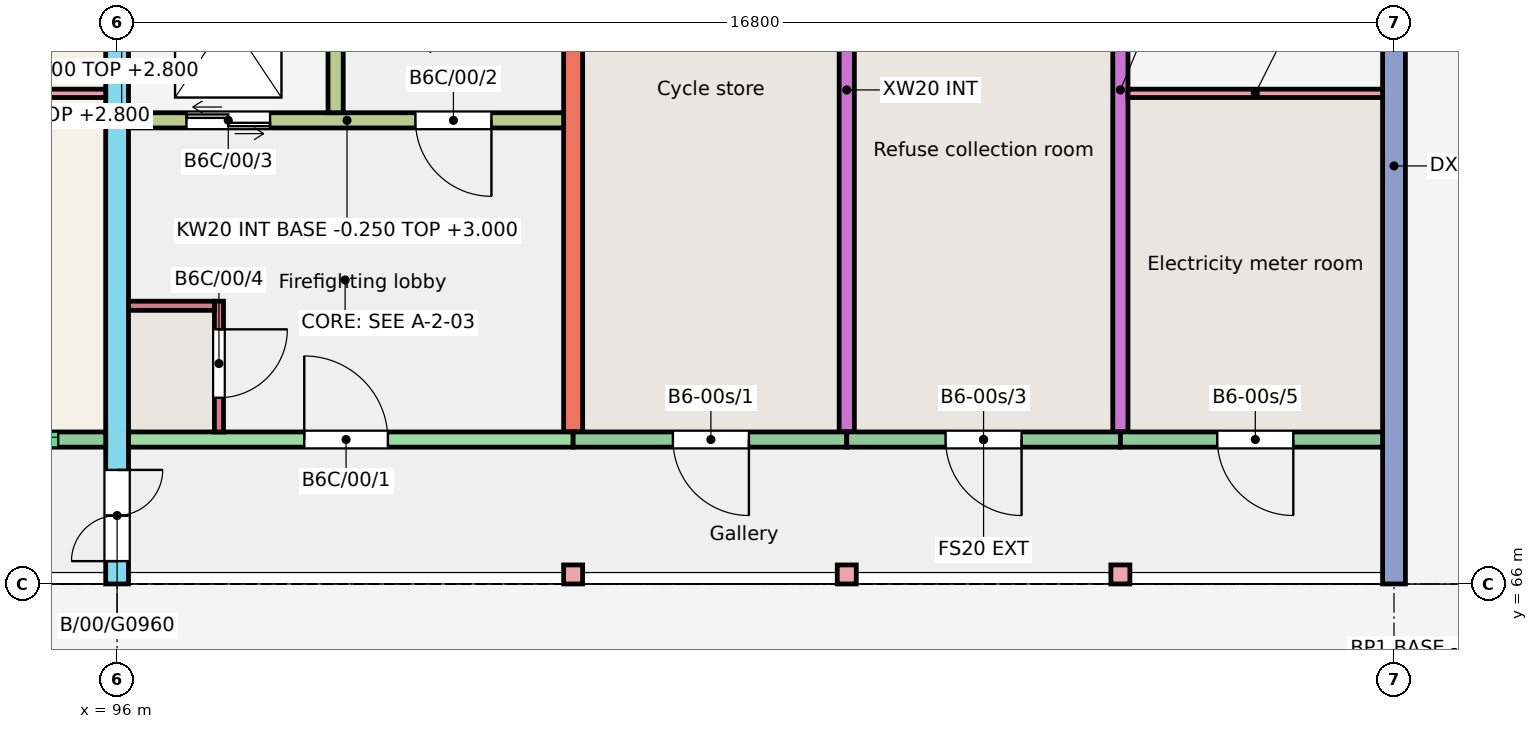
"""IFC4 building model, lengths in metres.
Left out: names, types, materials, properties, quantities, classifications, styles, units other than length and angle.
Written with IfcOpenShell. Run it as: python <this file> out.ifc"""

import sys

from ifc_helpers import new_model, si_unit, direction, frame, frame_2d, origin, origin_2d, place, context, subcontext, project, spatial, rectangle, extrude, element, fill, save


model = new_model("IFC4")
c1 = context("Model", 3, precision=1e-05, world=origin(), true_north=direction((0.0, 1.0)))
c2 = subcontext(c1, "Body", "Model", "MODEL_VIEW")
j1 = project(units=[si_unit("LENGTHUNIT", "METRE"), si_unit("PLANEANGLEUNIT", "RADIAN")], contexts=[c1])
p1 = place(None, origin())
s1 = spatial("IfcSite", under=j1, at=p1, CompositionType="ELEMENT")
p2 = place(p1, origin())
s2 = spatial("IfcBuilding", under=s1, at=p2, CompositionType="ELEMENT")
p3 = place(p2, origin())
s3 = spatial("IfcBuildingStorey", under=s2, at=p3, CompositionType="ELEMENT", Elevation=0.0)
p4 = place(p3, frame((96.0, 66.0, -0.25), z_axis=(0.0, 0.0, 1.0), x_axis=(0.0, 1.0, 0.0)))
e1 = element("IfcWall", 1, at=p4, inside=s3, PredefinedType="SHEAR", context=c2, shape_type="SweptSolid", body=[
    extrude(rectangle(XDim=11.0, YDim=0.3, at=frame_2d((5.5, 0.0))), origin(), (0.0, 0.0, 1.0), 3.25),
])
p5 = place(p4, frame((0.3, 0.0, 0.25)))
e2 = element("IfcOpeningElement", 2, at=p5, cuts=e1, PredefinedType="OPENING", context=c2, shape_type="SweptSolid", body=[
    extrude(rectangle(XDim=1.2, YDim=2.1, at=frame_2d((0.6, 1.05))), frame((0.0, 0.16, 0.0), z_axis=(0.0, -1.0, 0.0), x_axis=(1.0, 0.0, 0.0)), (0.0, 0.0, 1.0), 0.32),
])
p6 = place(p3, frame((102.0, 68.0, -0.25), z_axis=(0.0, 0.0, 1.0), x_axis=(0.0, 1.0, 0.0)))
e3 = element("IfcWall", 3, at=p6, inside=s3, PredefinedType="SHEAR", context=c2, shape_type="SweptSolid", body=[
    extrude(rectangle(XDim=9.0, YDim=0.25, at=frame_2d((4.5, 0.0))), origin(), (0.0, 0.0, 1.0), 3.25),
])
for number, where, z_axis, x_axis in (
    (4, (105.6, 68.0, -0.25), (0.0, 0.0, 1.0), (0.0, 1.0, 0.0)),
    (5, (109.2, 68.0, -0.25), (0.0, 0.0, 1.0), (0.0, 1.0, 0.0)),
):
    element("IfcWall", number, at=place(p3, frame(where, z_axis=z_axis, x_axis=x_axis)), inside=s3, PredefinedType="SHEAR", context=c2, shape_type="SweptSolid", body=[
        extrude(rectangle(XDim=9.0, YDim=0.2, at=frame_2d((4.5, 0.0))), origin(), (0.0, 0.0, 1.0), 3.25),
    ])
p7 = place(p3, frame((112.8, 66.0, -0.25), z_axis=(0.0, 0.0, 1.0), x_axis=(0.0, 1.0, 0.0)))
e6 = element("IfcWall", 6, at=p7, inside=s3, PredefinedType="SHEAR", context=c2, shape_type="SweptSolid", body=[
    extrude(rectangle(XDim=11.0, YDim=0.3, at=frame_2d((5.5, 0.0))), origin(), (0.0, 0.0, 1.0), 3.25),
])
p8 = place(p3, frame((92.4, 67.9, -0.25), z_axis=(0.0, 0.0, 1.0), x_axis=(1.0, 0.0, 0.0)))
e7 = element("IfcWall", 7, at=p8, inside=s3, PredefinedType="SOLIDWALL", context=c2, shape_type="SweptSolid", body=[
    extrude(rectangle(XDim=3.45, YDim=0.2, at=frame_2d((1.725, 0.0))), origin(), (0.0, 0.0, 1.0), 3.25),
])
p9 = place(p8, frame((0.725, 0.0, 1.45)))
e8 = element("IfcOpeningElement", 8, at=p9, cuts=e7, PredefinedType="OPENING", context=c2, shape_type="SweptSolid", body=[
    extrude(rectangle(XDim=2.1, YDim=1.2, at=frame_2d((1.05, 0.6))), frame((0.0, 0.11, 0.0), z_axis=(0.0, -1.0, 0.0), x_axis=(1.0, 0.0, 0.0)), (0.0, 0.0, 1.0), 0.22),
])
p10 = place(p3, frame((96.15, 67.9, -0.25), z_axis=(0.0, 0.0, 1.0), x_axis=(1.0, 0.0, 0.0)))
e9 = element("IfcWall", 9, at=p10, inside=s3, PredefinedType="SHEAR", context=c2, shape_type="SweptSolid", body=[
    extrude(rectangle(XDim=5.85, YDim=0.2, at=frame_2d((2.925, 0.0))), origin(), (0.0, 0.0, 1.0), 3.25),
])
p11 = place(p10, frame((2.312, 0.0, 0.25)))
e10 = element("IfcOpeningElement", 10, at=p11, cuts=e9, PredefinedType="OPENING", context=c2, shape_type="SweptSolid", body=[
    extrude(rectangle(XDim=1.1, YDim=2.1, at=frame_2d((0.55, 1.05))), frame((0.0, 0.11, 0.0), z_axis=(0.0, -1.0, 0.0), x_axis=(1.0, 0.0, 0.0)), (0.0, 0.0, 1.0), 0.22),
])
p12 = place(p3, frame((96.15, 72.1, -0.25), z_axis=(0.0, 0.0, 1.0), x_axis=(1.0, 0.0, 0.0)))
e11 = element("IfcWall", 11, at=p12, inside=s3, PredefinedType="SHEAR", context=c2, shape_type="SweptSolid", body=[
    extrude(rectangle(XDim=5.725, YDim=0.2, at=frame_2d((2.863, 0.0))), origin(), (0.0, 0.0, 1.0), 3.25),
])
p13 = place(p12, frame((3.775, 0.0, 0.25)))
e12 = element("IfcOpeningElement", 12, at=p13, cuts=e11, PredefinedType="OPENING", context=c2, shape_type="SweptSolid", body=[
    extrude(rectangle(XDim=1.0, YDim=2.1, at=frame_2d((0.5, 1.05))), frame((0.0, 0.11, 0.0), z_axis=(0.0, -1.0, 0.0), x_axis=(1.0, 0.0, 0.0)), (0.0, 0.0, 1.0), 0.22),
])
p14 = place(p12, frame((0.762, 0.0, 0.25)))
e13 = element("IfcOpeningElement", 13, at=p14, cuts=e11, PredefinedType="OPENING", context=c2, shape_type="SweptSolid", body=[
    extrude(rectangle(XDim=1.1, YDim=2.1, at=frame_2d((0.55, 1.05))), frame((0.0, 0.11, 0.0), z_axis=(0.0, -1.0, 0.0), x_axis=(1.0, 0.0, 0.0)), (0.0, 0.0, 1.0), 0.22),
])
p15 = place(p3, frame((98.875, 72.2, -0.25), z_axis=(0.0, 0.0, 1.0), x_axis=(0.0, 1.0, 0.0)))
e14 = element("IfcWall", 14, at=p15, inside=s3, PredefinedType="SHEAR", context=c2, shape_type="SweptSolid", body=[
    extrude(rectangle(XDim=4.8, YDim=0.2, at=frame_2d((2.4, 0.0))), origin(), (0.0, 0.0, 1.0), 3.25),
])
p16 = place(p3, frame((97.34, 68.0, -0.25), z_axis=(0.0, 0.0, 1.0), x_axis=(0.0, 1.0, 0.0)))
e15 = element("IfcWall", 15, at=p16, inside=s3, PredefinedType="SHEAR", context=c2, shape_type="SweptSolid", body=[
    extrude(rectangle(XDim=1.72, YDim=0.12, at=frame_2d((0.86, 0.0))), origin(), (0.0, 0.0, 1.0), 3.25),
])
p17 = place(p16, frame((0.45, 0.0, 0.25)))
e16 = element("IfcOpeningElement", 16, at=p17, cuts=e15, PredefinedType="OPENING", context=c2, shape_type="SweptSolid", body=[
    extrude(rectangle(XDim=0.9, YDim=2.1, at=frame_2d((0.45, 1.05))), frame((0.0, 0.07, 0.0), z_axis=(0.0, -1.0, 0.0), x_axis=(1.0, 0.0, 0.0)), (0.0, 0.0, 1.0), 0.14),
])
p18 = place(p3, frame((96.15, 69.66, -0.25), z_axis=(0.0, 0.0, 1.0), x_axis=(1.0, 0.0, 0.0)))
e17 = element("IfcWall", 17, at=p18, inside=s3, PredefinedType="SHEAR", context=c2, shape_type="SweptSolid", body=[
    extrude(rectangle(XDim=1.13, YDim=0.12, at=frame_2d((0.565, 0.0))), origin(), (0.0, 0.0, 1.0), 3.25),
])
p19 = place(p3, frame((102.0, 67.9, -0.25), z_axis=(0.0, 0.0, 1.0), x_axis=(1.0, 0.0, 0.0)))
e18 = element("IfcWall", 18, at=p19, inside=s3, PredefinedType="SOLIDWALL", context=c2, shape_type="SweptSolid", body=[
    extrude(rectangle(XDim=3.6, YDim=0.2, at=frame_2d((1.8, 0.0))), origin(), (0.0, 0.0, 1.0), 3.25),
])
p20 = place(p19, frame((1.312, 0.0, 0.25)))
e19 = element("IfcOpeningElement", 19, at=p20, cuts=e18, PredefinedType="OPENING", context=c2, shape_type="SweptSolid", body=[
    extrude(rectangle(XDim=1.0, YDim=2.1, at=frame_2d((0.5, 1.05))), frame((0.0, 0.11, 0.0), z_axis=(0.0, -1.0, 0.0), x_axis=(1.0, 0.0, 0.0)), (0.0, 0.0, 1.0), 0.22),
])
p21 = place(p3, frame((105.6, 67.9, -0.25), z_axis=(0.0, 0.0, 1.0), x_axis=(1.0, 0.0, 0.0)))
e20 = element("IfcWall", 20, at=p21, inside=s3, PredefinedType="SOLIDWALL", context=c2, shape_type="SweptSolid", body=[
    extrude(rectangle(XDim=3.6, YDim=0.2, at=frame_2d((1.8, 0.0))), origin(), (0.0, 0.0, 1.0), 3.25),
])
p22 = place(p21, frame((1.3, 0.0, 0.25)))
e21 = element("IfcOpeningElement", 21, at=p22, cuts=e20, PredefinedType="OPENING", context=c2, shape_type="SweptSolid", body=[
    extrude(rectangle(XDim=1.0, YDim=2.1, at=frame_2d((0.5, 1.05))), frame((0.0, 0.11, 0.0), z_axis=(0.0, -1.0, 0.0), x_axis=(1.0, 0.0, 0.0)), (0.0, 0.0, 1.0), 0.22),
])
p23 = place(p3, frame((109.2, 67.9, -0.25), z_axis=(0.0, 0.0, 1.0), x_axis=(1.0, 0.0, 0.0)))
e22 = element("IfcWall", 22, at=p23, inside=s3, PredefinedType="SOLIDWALL", context=c2, shape_type="SweptSolid", body=[
    extrude(rectangle(XDim=3.45, YDim=0.2, at=frame_2d((1.725, 0.0))), origin(), (0.0, 0.0, 1.0), 3.25),
])
p24 = place(p23, frame((1.275, 0.0, 0.25)))
e23 = element("IfcOpeningElement", 23, at=p24, cuts=e22, PredefinedType="OPENING", context=c2, shape_type="SweptSolid", body=[
    extrude(rectangle(XDim=1.0, YDim=2.1, at=frame_2d((0.5, 1.05))), frame((0.0, 0.11, 0.0), z_axis=(0.0, -1.0, 0.0), x_axis=(1.0, 0.0, 0.0)), (0.0, 0.0, 1.0), 0.22),
])
for number, where, z_axis, x_axis in (
    (24, (102.0, 66.125, -0.25), (0.0, 0.0, 1.0), (1.0, 0.0, 0.0)),
    (25, (105.6, 66.125, -0.25), (0.0, 0.0, 1.0), (1.0, 0.0, 0.0)),
    (26, (109.2, 66.125, -0.25), (0.0, 0.0, 1.0), (1.0, 0.0, 0.0)),
):
    element("IfcColumn", number, at=place(p3, frame(where, z_axis=z_axis, x_axis=x_axis)), inside=s3, PredefinedType="COLUMN", context=c2, shape_type="SweptSolid", body=[
        extrude(rectangle(XDim=0.25, YDim=0.25, at=origin_2d()), origin(), (0.0, 0.0, 1.0), 3.25),
    ])
p25 = place(p3, frame((96.0, 72.1, -1.4), z_axis=(0.0, 0.0, 1.0), x_axis=(1.0, 0.0, 0.0)))
e27 = element("IfcWall", 27, at=p25, inside=s3, PredefinedType="SHEAR", context=c2, shape_type="SweptSolid", body=[
    extrude(rectangle(XDim=2.975, YDim=0.2, at=frame_2d((1.488, 0.0))), origin(), (0.0, 0.0, 1.0), 1.15),
])
p26 = place(p3, frame((98.875, 72.2, -1.4), z_axis=(0.0, 0.0, 1.0), x_axis=(0.0, 1.0, 0.0)))
e28 = element("IfcWall", 28, at=p26, inside=s3, PredefinedType="SHEAR", context=c2, shape_type="SweptSolid", body=[
    extrude(rectangle(XDim=3.0, YDim=0.2, at=frame_2d((1.5, 0.0))), origin(), (0.0, 0.0, 1.0), 1.15),
])
p27 = place(p3, frame((96.075, 72.2, -1.4), z_axis=(0.0, 0.0, 1.0), x_axis=(0.0, 1.0, 0.0)))
e29 = element("IfcWall", 29, at=p27, inside=s3, PredefinedType="SHEAR", context=c2, shape_type="SweptSolid", body=[
    extrude(rectangle(XDim=3.0, YDim=0.15, at=frame_2d((1.5, 0.0))), origin(), (0.0, 0.0, 1.0), 1.15),
])
p28 = place(p3, frame((92.5, 72.455, 0.0), z_axis=(0.0, 0.0, 1.0), x_axis=(1.0, 0.0, 0.0)))
e30 = element("IfcWall", 30, at=p28, inside=s3, PredefinedType="PARTITIONING", context=c2, shape_type="SweptSolid", body=[
    extrude(rectangle(XDim=3.35, YDim=0.11, at=frame_2d((1.675, 0.0))), origin(), (0.0, 0.0, 1.0), 2.8),
])
p29 = place(p3, frame((109.3, 72.455, 0.0), z_axis=(0.0, 0.0, 1.0), x_axis=(1.0, 0.0, 0.0)))
e31 = element("IfcWall", 31, at=p29, inside=s3, PredefinedType="PARTITIONING", context=c2, shape_type="SweptSolid", body=[
    extrude(rectangle(XDim=3.35, YDim=0.11, at=frame_2d((1.675, 0.0))), origin(), (0.0, 0.0, 1.0), 2.8),
])
p30 = place(p9, origin())
e32 = element("IfcWindow", 32, at=p30, inside=s3, PartitioningType="SINGLE_PANEL", PredefinedType="WINDOW", context=c2, shape_type="SweptSolid", body=[
    extrude(rectangle(XDim=2.1, YDim=1.2, at=frame_2d((1.05, 0.6))), frame((0.0, 0.06, 0.0), z_axis=(0.0, -1.0, 0.0), x_axis=(1.0, 0.0, 0.0)), (0.0, 0.0, 1.0), 0.06),
])
fill(e8, e32)
p31 = place(p20, origin())
e33 = element("IfcDoor", 33, at=p31, inside=s3, OperationType="SINGLE_SWING_RIGHT", PredefinedType="DOOR", context=c2, shape_type="SweptSolid", body=[
    extrude(rectangle(XDim=1.0, YDim=2.1, at=frame_2d((0.5, 1.05))), frame((0.0, 0.025, 0.0), z_axis=(0.0, -1.0, 0.0), x_axis=(1.0, 0.0, 0.0)), (0.0, 0.0, 1.0), 0.05),
])
fill(e19, e33)
p32 = place(p22, origin())
e34 = element("IfcDoor", 34, at=p32, inside=s3, OperationType="SINGLE_SWING_RIGHT", PredefinedType="DOOR", context=c2, shape_type="SweptSolid", body=[
    extrude(rectangle(XDim=1.0, YDim=2.1, at=frame_2d((0.5, 1.05))), frame((0.0, 0.025, 0.0), z_axis=(0.0, -1.0, 0.0), x_axis=(1.0, 0.0, 0.0)), (0.0, 0.0, 1.0), 0.05),
])
fill(e21, e34)
p33 = place(p24, origin())
e35 = element("IfcDoor", 35, at=p33, inside=s3, OperationType="SINGLE_SWING_RIGHT", PredefinedType="DOOR", context=c2, shape_type="SweptSolid", body=[
    extrude(rectangle(XDim=1.0, YDim=2.1, at=frame_2d((0.5, 1.05))), frame((0.0, 0.025, 0.0), z_axis=(0.0, -1.0, 0.0), x_axis=(1.0, 0.0, 0.0)), (0.0, 0.0, 1.0), 0.05),
])
fill(e23, e35)
p34 = place(p11, origin())
e36 = element("IfcDoor", 36, at=p34, inside=s3, OperationType="SINGLE_SWING_LEFT", PredefinedType="DOOR", context=c2, shape_type="SweptSolid", body=[
    extrude(rectangle(XDim=1.1, YDim=2.1, at=frame_2d((0.55, 1.05))), frame((0.0, 0.025, 0.0), z_axis=(0.0, -1.0, 0.0), x_axis=(1.0, 0.0, 0.0)), (0.0, 0.0, 1.0), 0.05),
])
fill(e10, e36)
p35 = place(p13, origin())
e37 = element("IfcDoor", 37, at=p35, inside=s3, OperationType="SINGLE_SWING_RIGHT", PredefinedType="DOOR", context=c2, shape_type="SweptSolid", body=[
    extrude(rectangle(XDim=1.0, YDim=2.1, at=frame_2d((0.5, 1.05))), frame((0.0, 0.025, 0.0), z_axis=(0.0, -1.0, 0.0), x_axis=(1.0, 0.0, 0.0)), (0.0, 0.0, 1.0), 0.05),
])
fill(e12, e37)
p36 = place(p14, origin())
e38 = element("IfcDoor", 38, at=p36, inside=s3, OperationType="DOUBLE_DOOR_SLIDING", PredefinedType="DOOR", context=c2, shape_type="SweptSolid", body=[
    extrude(rectangle(XDim=1.1, YDim=2.1, at=frame_2d((0.55, 1.05))), frame((0.0, 0.025, 0.0), z_axis=(0.0, -1.0, 0.0), x_axis=(1.0, 0.0, 0.0)), (0.0, 0.0, 1.0), 0.05),
])
fill(e13, e38)
p37 = place(p17, origin())
e39 = element("IfcDoor", 39, at=p37, inside=s3, OperationType="SINGLE_SWING_RIGHT", PredefinedType="DOOR", context=c2, shape_type="SweptSolid", body=[
    extrude(rectangle(XDim=0.9, YDim=2.1, at=frame_2d((0.45, 1.05))), frame((0.0, 0.025, 0.0), z_axis=(0.0, -1.0, 0.0), x_axis=(1.0, 0.0, 0.0)), (0.0, 0.0, 1.0), 0.05),
])
fill(e16, e39)
p38 = place(p5, origin())
e40 = element("IfcDoor", 40, at=p38, inside=s3, OperationType="DOUBLE_DOOR_SINGLE_SWING", PredefinedType="DOOR", context=c2, shape_type="SweptSolid", body=[
    extrude(rectangle(XDim=1.2, YDim=2.1, at=frame_2d((0.6, 1.05))), frame((0.0, 0.025, 0.0), z_axis=(0.0, -1.0, 0.0), x_axis=(1.0, 0.0, 0.0)), (0.0, 0.0, 1.0), 0.05),
])
fill(e2, e40)
save(model, sys.argv[1])
